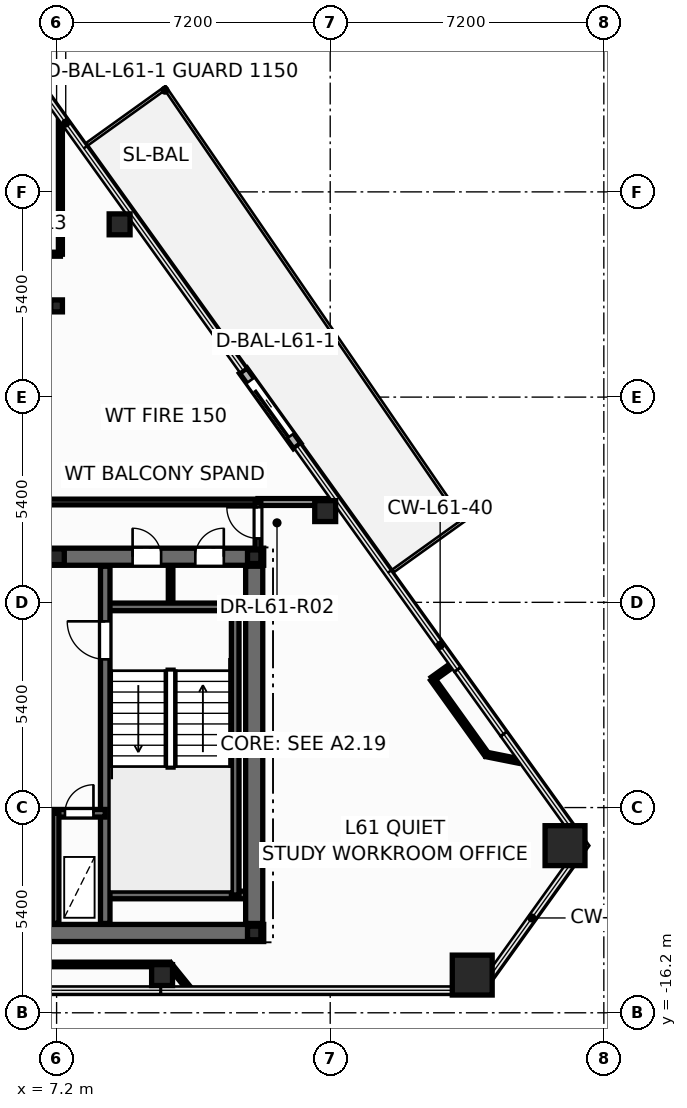
"""IFC4 building model, lengths in metres.
Left out: names, types, materials, properties, quantities, classifications, styles, units other than length and angle.
Written with IfcOpenShell. Run it as: python <this file> out.ifc"""

import sys

from ifc_helpers import new_model, si_unit, direction, frame, frame_2d, origin, origin_2d, place, context, subcontext, project, spatial, rectangle, hollow_rectangle, hollow_circle, i_section, extrude, element, fill, save


model = new_model("IFC4")
c1 = context("Model", 3, precision=1e-05, world=origin(), true_north=direction((0.0, 1.0)))
c2 = subcontext(c1, "Body", "Model", "MODEL_VIEW")
j1 = project(units=[si_unit("LENGTHUNIT", "METRE"), si_unit("PLANEANGLEUNIT", "RADIAN")], contexts=[c1])
p1 = place(None, origin())
s1 = spatial("IfcSite", under=j1, at=p1, CompositionType="ELEMENT")
p2 = place(p1, origin())
s2 = spatial("IfcBuilding", under=s1, at=p2, CompositionType="ELEMENT")
p3 = place(p2, frame((0.0, 0.0, 233.4)))
s3 = spatial("IfcBuildingStorey", under=s2, at=p3, CompositionType="ELEMENT", Elevation=233.4)
for number, where, z_axis, x_axis in (
    (1, (18.137, -15.208, 0.0), (0.0, 0.0, 1.0), (1.0, 0.0, 0.0)),
    (2, (20.579, -11.802, 0.0), (0.0, 0.0, 1.0), (1.0, 0.0, 0.0)),
):
    element("IfcColumn", number, at=place(p3, frame(where, z_axis=z_axis, x_axis=x_axis)), inside=s3, PredefinedType="COLUMN", context=c2, shape_type="SweptSolid", body=[
        extrude(hollow_rectangle(XDim=1.05, YDim=1.05, WallThickness=0.045, at=origin_2d()), origin(), (0.0, 0.0, 1.0), 3.6),
    ])
for number, where, z_axis, x_axis in (
    (3, (9.976, -15.208, 0.0), (0.0, 0.0, 1.0), (1.0, 0.0, 0.0)),
    (4, (14.268, -2.999, 0.0), (0.0, 0.0, 1.0), (1.0, 0.0, 0.0)),
    (5, (8.858, 4.546, 0.0), (0.0, 0.0, 1.0), (1.0, 0.0, 0.0)),
):
    element("IfcColumn", number, at=place(p3, frame(where, z_axis=z_axis, x_axis=x_axis)), inside=s3, PredefinedType="COLUMN", context=c2, shape_type="SweptSolid", body=[
        extrude(hollow_circle(Radius=0.275, WallThickness=0.024, at=origin_2d()), origin(), (0.0, 0.0, 1.0), 3.6),
    ])
for number, where, z_axis, x_axis in (
    (6, (12.4, -14.1, 0.0), (0.0, 0.0, 1.0), (1.0, 0.0, 0.0)),
    (7, (12.4, -4.2, 0.0), (0.0, 0.0, 1.0), (1.0, 0.0, 0.0)),
):
    element("IfcColumn", number, at=place(p3, frame(where, z_axis=z_axis, x_axis=x_axis)), inside=s3, PredefinedType="COLUMN", context=c2, shape_type="SweptSolid", body=[
        extrude(i_section(OverallWidth=0.352, OverallDepth=0.359, WebThickness=0.018, FlangeThickness=0.026, at=origin_2d()), origin(), (0.0, 0.0, 1.0), 3.6),
    ])
p4 = place(p3, frame((7.2, -4.2, 0.0), z_axis=(0.0, 0.0, 1.0), x_axis=(1.0, 0.0, 0.0)))
e8 = element("IfcColumn", 8, at=p4, inside=s3, PredefinedType="PILASTER", context=c2, shape_type="SweptSolid", body=[
    extrude(i_section(OverallWidth=0.405, OverallDepth=0.414, WebThickness=0.022, FlangeThickness=0.032, at=origin_2d()), origin(), (0.0, 0.0, 1.0), 3.6),
])
p5 = place(p3, frame((7.2, 2.4, 0.0), z_axis=(0.0, 0.0, 1.0), x_axis=(1.0, 0.0, 0.0)))
e9 = element("IfcColumn", 9, at=p5, inside=s3, PredefinedType="COLUMN", context=c2, shape_type="SweptSolid", body=[
    extrude(i_section(OverallWidth=0.307, OverallDepth=0.314, WebThickness=0.012, FlangeThickness=0.019, at=origin_2d()), origin(), (0.0, 0.0, 1.0), 3.6),
])
p6 = place(p3, frame((13.532, -1.287, -0.015), z_axis=(0.0, 0.0, 1.0), x_axis=(-0.582666574714, 0.812711303423, 0.0)))
e10 = element("IfcWall", 10, at=p6, inside=s3, PredefinedType="STANDARD", context=c2, shape_type="SweptSolid", body=[
    extrude(rectangle(XDim=2.44, YDim=0.24, at=frame_2d((1.22, 0.0))), origin(), (0.0, 0.0, 1.0), 2.878),
])
p7 = place(p6, frame((0.32, 0.0, 0.015)))
e11 = element("IfcOpeningElement", 11, at=p7, cuts=e10, PredefinedType="OPENING", context=c2, shape_type="SweptSolid", body=[
    extrude(rectangle(XDim=1.806, YDim=2.204, at=frame_2d((0.9, 1.102))), frame((0.0, 0.13, 0.0), z_axis=(0.0, -1.0, 0.0), x_axis=(1.0, 0.0, 0.0)), (0.0, 0.0, 1.0), 0.26),
])
p8 = place(p3, frame((10.2, -5.52, 0.0), z_axis=(0.0, 0.0, 1.0), x_axis=(0.0, 1.0, 0.0)))
e12 = element("IfcWall", 12, at=p8, inside=s3, PredefinedType="PARTITIONING", context=c2, shape_type="SweptSolid", body=[
    extrude(rectangle(XDim=1.12, YDim=0.12, at=frame_2d((0.56, 0.0))), origin(), (0.0, 0.0, 1.0), 3.345),
])
p9 = place(p3, frame((-12.65, -14.1, 0.0), z_axis=(0.0, 0.0, 1.0), x_axis=(1.0, 0.0, 0.0)))
e13 = element("IfcWall", 13, at=p9, inside=s3, PredefinedType="SHEAR", context=c2, shape_type="SweptSolid", body=[
    extrude(rectangle(XDim=25.3, YDim=0.45, at=frame_2d((12.65, 0.0))), origin(), (0.0, 0.0, 1.0), 3.6),
])
p10 = place(p3, frame((-12.65, -4.2, 0.0), z_axis=(0.0, 0.0, 1.0), x_axis=(1.0, 0.0, 0.0)))
e14 = element("IfcWall", 14, at=p10, inside=s3, PredefinedType="SHEAR", context=c2, shape_type="SweptSolid", body=[
    extrude(rectangle(XDim=25.3, YDim=0.45, at=frame_2d((12.65, 0.0))), origin(), (0.0, 0.0, 1.0), 3.6),
])
p11 = place(p10, frame((1.85, 0.0, 0.0)))
e15 = element("IfcOpeningElement", 15, at=p11, cuts=e14, PredefinedType="OPENING", context=c2, shape_type="SweptSolid", body=[
    extrude(rectangle(XDim=0.756, YDim=2.054, at=frame_2d((0.375, 1.027))), frame((0.0, 0.235, 0.0), z_axis=(0.0, -1.0, 0.0), x_axis=(1.0, 0.0, 0.0)), (0.0, 0.0, 1.0), 0.47),
])
p12 = place(p10, frame((21.85, 0.0, 0.0)))
e16 = element("IfcOpeningElement", 16, at=p12, cuts=e14, PredefinedType="OPENING", context=c2, shape_type="SweptSolid", body=[
    extrude(rectangle(XDim=0.756, YDim=2.054, at=frame_2d((0.375, 1.027))), frame((0.0, 0.235, 0.0), z_axis=(0.0, -1.0, 0.0), x_axis=(1.0, 0.0, 0.0)), (0.0, 0.0, 1.0), 0.47),
])
p13 = place(p10, frame((23.5, 0.0, 0.0)))
e17 = element("IfcOpeningElement", 17, at=p13, cuts=e14, PredefinedType="OPENING", context=c2, shape_type="SweptSolid", body=[
    extrude(rectangle(XDim=0.756, YDim=2.054, at=frame_2d((0.375, 1.027))), frame((0.0, 0.235, 0.0), z_axis=(0.0, -1.0, 0.0), x_axis=(1.0, 0.0, 0.0)), (0.0, 0.0, 1.0), 0.47),
])
p14 = place(p10, frame((5.85, 0.0, 0.0)))
e18 = element("IfcOpeningElement", 18, at=p14, cuts=e14, PredefinedType="OPENING", context=c2, shape_type="SweptSolid", body=[
    extrude(rectangle(XDim=1.006, YDim=2.104, at=frame_2d((0.5, 1.052))), frame((0.0, 0.235, 0.0), z_axis=(0.0, -1.0, 0.0), x_axis=(1.0, 0.0, 0.0)), (0.0, 0.0, 1.0), 0.47),
])
p15 = place(p10, frame((10.35, 0.0, 0.0)))
e19 = element("IfcOpeningElement", 19, at=p15, cuts=e14, PredefinedType="OPENING", context=c2, shape_type="SweptSolid", body=[
    extrude(rectangle(XDim=1.406, YDim=2.154, at=frame_2d((0.7, 1.077))), frame((0.0, 0.235, 0.0), z_axis=(0.0, -1.0, 0.0), x_axis=(1.0, 0.0, 0.0)), (0.0, 0.0, 1.0), 0.47),
])
p16 = place(p10, frame((18.45, 0.0, 0.0)))
e20 = element("IfcOpeningElement", 20, at=p16, cuts=e14, PredefinedType="OPENING", context=c2, shape_type="SweptSolid", body=[
    extrude(rectangle(XDim=1.006, YDim=2.104, at=frame_2d((0.5, 1.052))), frame((0.0, 0.235, 0.0), z_axis=(0.0, -1.0, 0.0), x_axis=(1.0, 0.0, 0.0)), (0.0, 0.0, 1.0), 0.47),
])
for number, where, z_axis, x_axis in (
    (21, (8.48, -5.52, 0.0), (0.0, 0.0, 1.0), (1.0, 0.0, 0.0)),
    (22, (8.48, -13.1, 0.0), (0.0, 0.0, 1.0), (1.0, 0.0, 0.0)),
):
    element("IfcWall", number, at=place(p3, frame(where, z_axis=z_axis, x_axis=x_axis)), inside=s3, PredefinedType="SOLIDWALL", context=c2, shape_type="SweptSolid", body=[
        extrude(rectangle(XDim=3.87, YDim=0.2, at=frame_2d((1.935, 0.0))), origin(), (0.0, 0.0, 1.0), 3.6),
    ])
p17 = place(p3, frame((11.9, -13.1, 0.0), z_axis=(0.0, 0.0, 1.0), x_axis=(0.0, 1.0, 0.0)))
e23 = element("IfcWall", 23, at=p17, inside=s3, PredefinedType="SOLIDWALL", context=c2, shape_type="SweptSolid", body=[
    extrude(rectangle(XDim=7.58, YDim=0.2, at=frame_2d((3.79, 0.0))), origin(), (0.0, 0.0, 1.0), 3.6),
])
p18 = place(p3, frame((8.48, -13.85, 0.0), z_axis=(0.0, 0.0, 1.0), x_axis=(0.0, 1.0, 0.0)))
e24 = element("IfcWall", 24, at=p18, inside=s3, PredefinedType="SHEAR", context=c2, shape_type="SweptSolid", body=[
    extrude(rectangle(XDim=9.4, YDim=0.25, at=frame_2d((4.7, 0.0))), origin(), (0.0, 0.0, 1.0), 3.6),
])
p19 = place(p18, frame((6.95, 0.0, 0.0)))
e25 = element("IfcOpeningElement", 25, at=p19, cuts=e24, PredefinedType="OPENING", context=c2, shape_type="SweptSolid", body=[
    extrude(rectangle(XDim=1.006, YDim=2.104, at=frame_2d((0.5, 1.052))), frame((0.0, 0.135, 0.0), z_axis=(0.0, -1.0, 0.0), x_axis=(1.0, 0.0, 0.0)), (0.0, 0.0, 1.0), 0.27),
])
p20 = place(p3, frame((5.12, -10.95, 0.0), z_axis=(0.0, 0.0, 1.0), x_axis=(1.0, 0.0, 0.0)))
e26 = element("IfcWall", 26, at=p20, inside=s3, PredefinedType="SOLIDWALL", context=c2, shape_type="SweptSolid", body=[
    extrude(rectangle(XDim=3.36, YDim=0.2, at=frame_2d((1.68, 0.0))), origin(), (0.0, 0.0, 1.0), 3.6),
])
p21 = place(p20, frame((0.42, 0.0, 0.0)))
e27 = element("IfcOpeningElement", 27, at=p21, cuts=e26, PredefinedType="OPENING", context=c2, shape_type="SweptSolid", body=[
    extrude(rectangle(XDim=1.106, YDim=2.104, at=frame_2d((0.55, 1.052))), frame((0.0, 0.11, 0.0), z_axis=(0.0, -1.0, 0.0), x_axis=(1.0, 0.0, 0.0)), (0.0, 0.0, 1.0), 0.22),
])
p22 = place(p20, frame((2.3, 0.0, 0.0)))
e28 = element("IfcOpeningElement", 28, at=p22, cuts=e26, PredefinedType="OPENING", context=c2, shape_type="SweptSolid", body=[
    extrude(rectangle(XDim=0.756, YDim=2.054, at=frame_2d((0.375, 1.027))), frame((0.0, 0.11, 0.0), z_axis=(0.0, -1.0, 0.0), x_axis=(1.0, 0.0, 0.0)), (0.0, 0.0, 1.0), 0.22),
])
p23 = place(p3, frame((7.18, -13.85, 0.0), z_axis=(0.0, 0.0, 1.0), x_axis=(0.0, 1.0, 0.0)))
e29 = element("IfcWall", 29, at=p23, inside=s3, PredefinedType="PARTITIONING", context=c2, shape_type="SweptSolid", body=[
    extrude(rectangle(XDim=2.9, YDim=0.16, at=frame_2d((1.45, 0.0))), origin(), (0.0, 0.0, 1.0), 2.57),
])
p24 = place(p3, frame((12.4, -13.85, 0.0), z_axis=(0.0, 0.0, 1.0), x_axis=(0.0, 1.0, 0.0)))
e30 = element("IfcWall", 30, at=p24, inside=s3, PredefinedType="SHEAR", context=c2, shape_type="SweptSolid", body=[
    extrude(rectangle(XDim=9.4, YDim=0.45, at=frame_2d((4.7, 0.0))), origin(), (0.0, 0.0, 1.0), 3.6),
])
p25 = place(p3, frame((3.34, -2.76, 0.0), z_axis=(0.0, 0.0, 1.0), x_axis=(1.0, 0.0, 0.0)))
e31 = element("IfcWall", 31, at=p25, inside=s3, PredefinedType="PARTITIONING", context=c2, shape_type="SweptSolid", body=[
    extrude(rectangle(XDim=9.16, YDim=0.15, at=frame_2d((4.58, 0.0))), origin(), (0.0, 0.0, 1.0), 2.32),
])
p26 = place(p25, frame((0.399, 0.0, 0.0)))
e32 = element("IfcOpeningElement", 32, at=p26, cuts=e31, PredefinedType="OPENING", context=c2, shape_type="SweptSolid", body=[
    extrude(rectangle(XDim=0.906, YDim=2.104, at=frame_2d((0.45, 1.052))), frame((0.0, 0.085, 0.0), z_axis=(0.0, -1.0, 0.0), x_axis=(1.0, 0.0, 0.0)), (0.0, 0.0, 1.0), 0.17),
])
p27 = place(p3, frame((6.323, -14.928, 0.0), z_axis=(0.0, 0.0, 1.0), x_axis=(1.0, 0.0, 0.0)))
e33 = element("IfcWall", 33, at=p27, inside=s3, PredefinedType="PARTITIONING", context=c2, shape_type="SweptSolid", body=[
    extrude(rectangle(XDim=3.845, YDim=0.12, at=frame_2d((1.922, 0.0))), origin(), (0.0, 0.0, 1.0), 2.863),
])
p28 = place(p3, frame((7.3, 3.76, 0.0), z_axis=(0.0, 0.0, 1.0), x_axis=(0.0, 1.0, 0.0)))
e34 = element("IfcWall", 34, at=p28, inside=s3, PredefinedType="PARTITIONING", context=c2, shape_type="SweptSolid", body=[
    extrude(rectangle(XDim=3.646, YDim=0.105, at=frame_2d((1.823, 0.0))), origin(), (0.0, 0.0, 1.0), 2.62),
])
p29 = place(p3, frame((3.4, 3.76, 0.0), z_axis=(0.0, 0.0, 1.0), x_axis=(1.0, 0.0, 0.0)))
e35 = element("IfcWall", 35, at=p29, inside=s3, PredefinedType="PARTITIONING", context=c2, shape_type="SweptSolid", body=[
    extrude(rectangle(XDim=3.9, YDim=0.105, at=frame_2d((1.95, 0.0))), origin(), (0.0, 0.0, 1.0), 2.62),
])
p30 = place(p3, frame((18.515, -9.404, 0.0), z_axis=(0.0, 0.0, 1.0), x_axis=(-0.58269400411, 0.812691637446, 0.0)))
e36 = element("IfcWall", 36, at=p30, inside=s3, PredefinedType="PARTITIONING", context=c2, shape_type="SweptSolid", body=[
    extrude(rectangle(XDim=2.441, YDim=0.12, at=frame_2d((1.221, 0.0))), origin(), (0.0, 0.0, 1.0), 3.345),
])
p31 = place(p3, frame((12.5, -2.76, 0.0), z_axis=(0.0, 0.0, 1.0), x_axis=(1.0, 0.0, 0.0)))
e37 = element("IfcWall", 37, at=p31, inside=s3, PredefinedType="PARTITIONING", context=c2, shape_type="SweptSolid", body=[
    extrude(rectangle(XDim=2.088, YDim=0.18, at=frame_2d((1.044, 0.0))), origin(), (0.0, 0.0, 1.0), 2.62),
])
p32 = place(p3, frame((12.5, -4.24, 0.0), z_axis=(0.0, 0.0, 1.0), x_axis=(0.0, 1.0, 0.0)))
e38 = element("IfcWall", 38, at=p32, inside=s3, PredefinedType="PARTITIONING", context=c2, shape_type="SweptSolid", body=[
    extrude(rectangle(XDim=1.48, YDim=0.15, at=frame_2d((0.74, 0.0))), origin(), (0.0, 0.0, 1.0), 2.32),
])
p33 = place(p32, frame((0.522, 0.0, 0.0)))
e39 = element("IfcOpeningElement", 39, at=p33, cuts=e38, PredefinedType="OPENING", context=c2, shape_type="SweptSolid", body=[
    extrude(rectangle(XDim=0.826, YDim=2.104, at=frame_2d((0.41, 1.052))), frame((0.0, 0.085, 0.0), z_axis=(0.0, -1.0, 0.0), x_axis=(1.0, 0.0, 0.0)), (0.0, 0.0, 1.0), 0.17),
])
p34 = place(p3, frame((10.167, -14.928, 0.0), z_axis=(0.0, 0.0, 1.0), x_axis=(0.629344812131, -0.77712618502, 0.0)))
e40 = element("IfcWall", 40, at=p34, inside=s3, PredefinedType="PARTITIONING", context=c2, shape_type="SweptSolid", body=[
    extrude(rectangle(XDim=0.862, YDim=0.12, at=frame_2d((0.431, 0.0))), origin(), (0.0, 0.0, 1.0), 2.863),
])
p35 = place(p3, frame((19.349, -9.571, 0.0), z_axis=(0.0, 0.0, 1.0), x_axis=(-0.980525420843, 0.196392207279, 0.0)))
e41 = element("IfcWall", 41, at=p35, inside=s3, PredefinedType="PARTITIONING", context=c2, shape_type="SweptSolid", body=[
    extrude(rectangle(XDim=0.85, YDim=0.12, at=frame_2d((0.425, 0.0))), origin(), (0.0, 0.0, 1.0), 2.863),
])
p36 = place(p3, frame((17.093, -7.42, 0.0), z_axis=(0.0, 0.0, 1.0), x_axis=(0.812673311452, 0.582719562786, 0.0)))
e42 = element("IfcWall", 42, at=p36, inside=s3, PredefinedType="PARTITIONING", context=c2, shape_type="SweptSolid", body=[
    extrude(rectangle(XDim=0.67, YDim=0.12, at=frame_2d((0.335, 0.0))), origin(), (0.0, 0.0, 1.0), 2.863),
])
p37 = place(p7, origin())
e43 = element("IfcDoor", 43, at=p37, inside=s3, OperationType="SLIDING_TO_LEFT", PredefinedType="DOOR", context=c2, shape_type="SweptSolid", body=[
    extrude(rectangle(XDim=1.8, YDim=2.2, at=frame_2d((0.9, 1.1))), frame((0.0, 0.025, 0.0), z_axis=(0.0, -1.0, 0.0), x_axis=(1.0, 0.0, 0.0)), (0.0, 0.0, 1.0), 0.05),
])
fill(e11, e43)
p38 = place(p19, origin())
e44 = element("IfcDoor", 44, at=p38, inside=s3, OperationType="SINGLE_SWING_RIGHT", PredefinedType="DOOR", context=c2, shape_type="SweptSolid", body=[
    extrude(rectangle(XDim=1.0, YDim=2.1, at=frame_2d((0.5, 1.05))), frame((0.0, 0.025, 0.0), z_axis=(0.0, -1.0, 0.0), x_axis=(1.0, 0.0, 0.0)), (0.0, 0.0, 1.0), 0.05),
])
fill(e25, e44)
p39 = place(p22, origin())
e45 = element("IfcDoor", 45, at=p39, inside=s3, OperationType="SINGLE_SWING_RIGHT", PredefinedType="DOOR", context=c2, shape_type="SweptSolid", body=[
    extrude(rectangle(XDim=0.75, YDim=2.05, at=frame_2d((0.375, 1.025))), frame((0.0, 0.025, 0.0), z_axis=(0.0, -1.0, 0.0), x_axis=(1.0, 0.0, 0.0)), (0.0, 0.0, 1.0), 0.05),
])
fill(e28, e45)
p40 = place(p12, origin())
e46 = element("IfcDoor", 46, at=p40, inside=s3, OperationType="SINGLE_SWING_LEFT", PredefinedType="DOOR", context=c2, shape_type="SweptSolid", body=[
    extrude(rectangle(XDim=0.75, YDim=2.05, at=frame_2d((0.375, 1.025))), frame((0.0, 0.025, 0.0), z_axis=(0.0, -1.0, 0.0), x_axis=(1.0, 0.0, 0.0)), (0.0, 0.0, 1.0), 0.05),
])
fill(e16, e46)
p41 = place(p13, origin())
e47 = element("IfcDoor", 47, at=p41, inside=s3, OperationType="SINGLE_SWING_RIGHT", PredefinedType="DOOR", context=c2, shape_type="SweptSolid", body=[
    extrude(rectangle(XDim=0.75, YDim=2.05, at=frame_2d((0.375, 1.025))), frame((0.0, 0.025, 0.0), z_axis=(0.0, -1.0, 0.0), x_axis=(1.0, 0.0, 0.0)), (0.0, 0.0, 1.0), 0.05),
])
fill(e17, e47)
p42 = place(p33, origin())
e48 = element("IfcDoor", 48, at=p42, inside=s3, OperationType="SINGLE_SWING_RIGHT", PredefinedType="DOOR", context=c2, shape_type="SweptSolid", body=[
    extrude(rectangle(XDim=0.82, YDim=2.1, at=frame_2d((0.41, 1.05))), frame((0.0, 0.025, 0.0), z_axis=(0.0, -1.0, 0.0), x_axis=(1.0, 0.0, 0.0)), (0.0, 0.0, 1.0), 0.05),
])
fill(e39, e48)
save(model, sys.argv[1])
